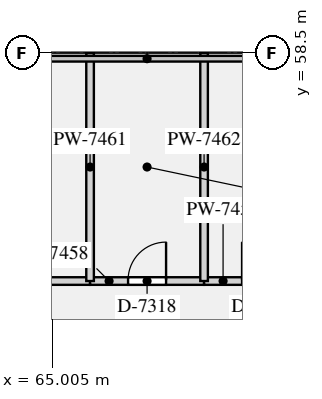
"""IFC4 building model, lengths in metres.
Left out: names, types, materials, properties, quantities, classifications, styles, units other than length and angle.
Written with IfcOpenShell. Run it as: python <this file> out.ifc"""

import sys

from ifc_helpers import new_model, si_unit, direction, frame, frame_2d, origin, place, context, subcontext, project, spatial, rectangle, extrude, element, fill, save


model = new_model("IFC4")
c1 = context("Model", 3, precision=1e-05, world=origin(), true_north=direction((0.0, 1.0)))
c2 = subcontext(c1, "Body", "Model", "MODEL_VIEW")
j1 = project(units=[si_unit("LENGTHUNIT", "METRE"), si_unit("PLANEANGLEUNIT", "RADIAN")], contexts=[c1])
p1 = place(None, origin())
s1 = spatial("IfcSite", under=j1, at=p1, CompositionType="ELEMENT")
p2 = place(p1, origin())
s2 = spatial("IfcBuilding", under=s1, at=p2, CompositionType="ELEMENT")
p3 = place(p2, frame((0.0, 0.0, 6.5)))
s3 = spatial("IfcBuildingStorey", under=s2, at=p3, CompositionType="ELEMENT", Elevation=6.5)
p4 = place(p3, frame((60.0, 52.5, 0.0), z_axis=(0.0, 0.0, 1.0), x_axis=(1.0, 0.0, 0.0)))
e1 = element("IfcWall", 1, at=p4, inside=s3, PredefinedType="PARTITIONING", context=c2, shape_type="SweptSolid", body=[
    extrude(rectangle(XDim=6.0, YDim=0.2, at=frame_2d((3.0, 0.0))), origin(), (0.0, 0.0, 1.0), 4.098),
])
p5 = place(p4, frame((2.5, 0.0, 0.0)))
e2 = element("IfcOpeningElement", 2, at=p5, cuts=e1, PredefinedType="OPENING", context=c2, shape_type="SweptSolid", body=[
    extrude(rectangle(XDim=1.0, YDim=2.1, at=frame_2d((0.5, 1.05))), frame((0.0, 0.11, 0.0), z_axis=(0.0, -1.0, 0.0), x_axis=(1.0, 0.0, 0.0)), (0.0, 0.0, 1.0), 0.22),
])
p6 = place(p3, frame((66.0, 52.5, 0.0), z_axis=(0.0, 0.0, 1.0), x_axis=(1.0, 0.0, 0.0)))
e3 = element("IfcWall", 3, at=p6, inside=s3, PredefinedType="PARTITIONING", context=c2, shape_type="SweptSolid", body=[
    extrude(rectangle(XDim=3.0, YDim=0.2, at=frame_2d((1.5, 0.0))), origin(), (0.0, 0.0, 1.0), 4.098),
])
p7 = place(p6, frame((1.0, 0.0, 0.0)))
e4 = element("IfcOpeningElement", 4, at=p7, cuts=e3, PredefinedType="OPENING", context=c2, shape_type="SweptSolid", body=[
    extrude(rectangle(XDim=1.0, YDim=2.1, at=frame_2d((0.5, 1.05))), frame((0.0, 0.11, 0.0), z_axis=(0.0, -1.0, 0.0), x_axis=(1.0, 0.0, 0.0)), (0.0, 0.0, 1.0), 0.22),
])
p8 = place(p3, frame((69.0, 52.5, 0.0), z_axis=(0.0, 0.0, 1.0), x_axis=(1.0, 0.0, 0.0)))
e5 = element("IfcWall", 5, at=p8, inside=s3, PredefinedType="PARTITIONING", context=c2, shape_type="SweptSolid", body=[
    extrude(rectangle(XDim=3.0, YDim=0.2, at=frame_2d((1.5, 0.0))), origin(), (0.0, 0.0, 1.0), 4.098),
])
p9 = place(p8, frame((1.0, 0.0, 0.0)))
e6 = element("IfcOpeningElement", 6, at=p9, cuts=e5, PredefinedType="OPENING", context=c2, shape_type="SweptSolid", body=[
    extrude(rectangle(XDim=1.0, YDim=2.1, at=frame_2d((0.5, 1.05))), frame((0.0, 0.11, 0.0), z_axis=(0.0, -1.0, 0.0), x_axis=(1.0, 0.0, 0.0)), (0.0, 0.0, 1.0), 0.22),
])
for number, where, z_axis, x_axis in (
    (7, (66.0, 52.5, 0.0), (0.0, 0.0, 1.0), (0.0, 1.0, 0.0)),
    (8, (69.0, 52.5, 0.0), (0.0, 0.0, 1.0), (0.0, 1.0, 0.0)),
):
    element("IfcWall", number, at=place(p3, frame(where, z_axis=z_axis, x_axis=x_axis)), inside=s3, PredefinedType="PARTITIONING", context=c2, shape_type="SweptSolid", body=[
        extrude(rectangle(XDim=6.0, YDim=0.2, at=frame_2d((3.0, 0.0))), origin(), (0.0, 0.0, 1.0), 4.098),
    ])
p10 = place(p7, origin())
e9 = element("IfcDoor", 9, at=p10, inside=s3, OperationType="SINGLE_SWING_RIGHT", PredefinedType="DOOR", context=c2, shape_type="SweptSolid", body=[
    extrude(rectangle(XDim=1.0, YDim=2.1, at=frame_2d((0.5, 1.05))), frame((0.0, 0.025, 0.0), z_axis=(0.0, -1.0, 0.0), x_axis=(1.0, 0.0, 0.0)), (0.0, 0.0, 1.0), 0.05),
])
fill(e4, e9)
save(model, sys.argv[1])
